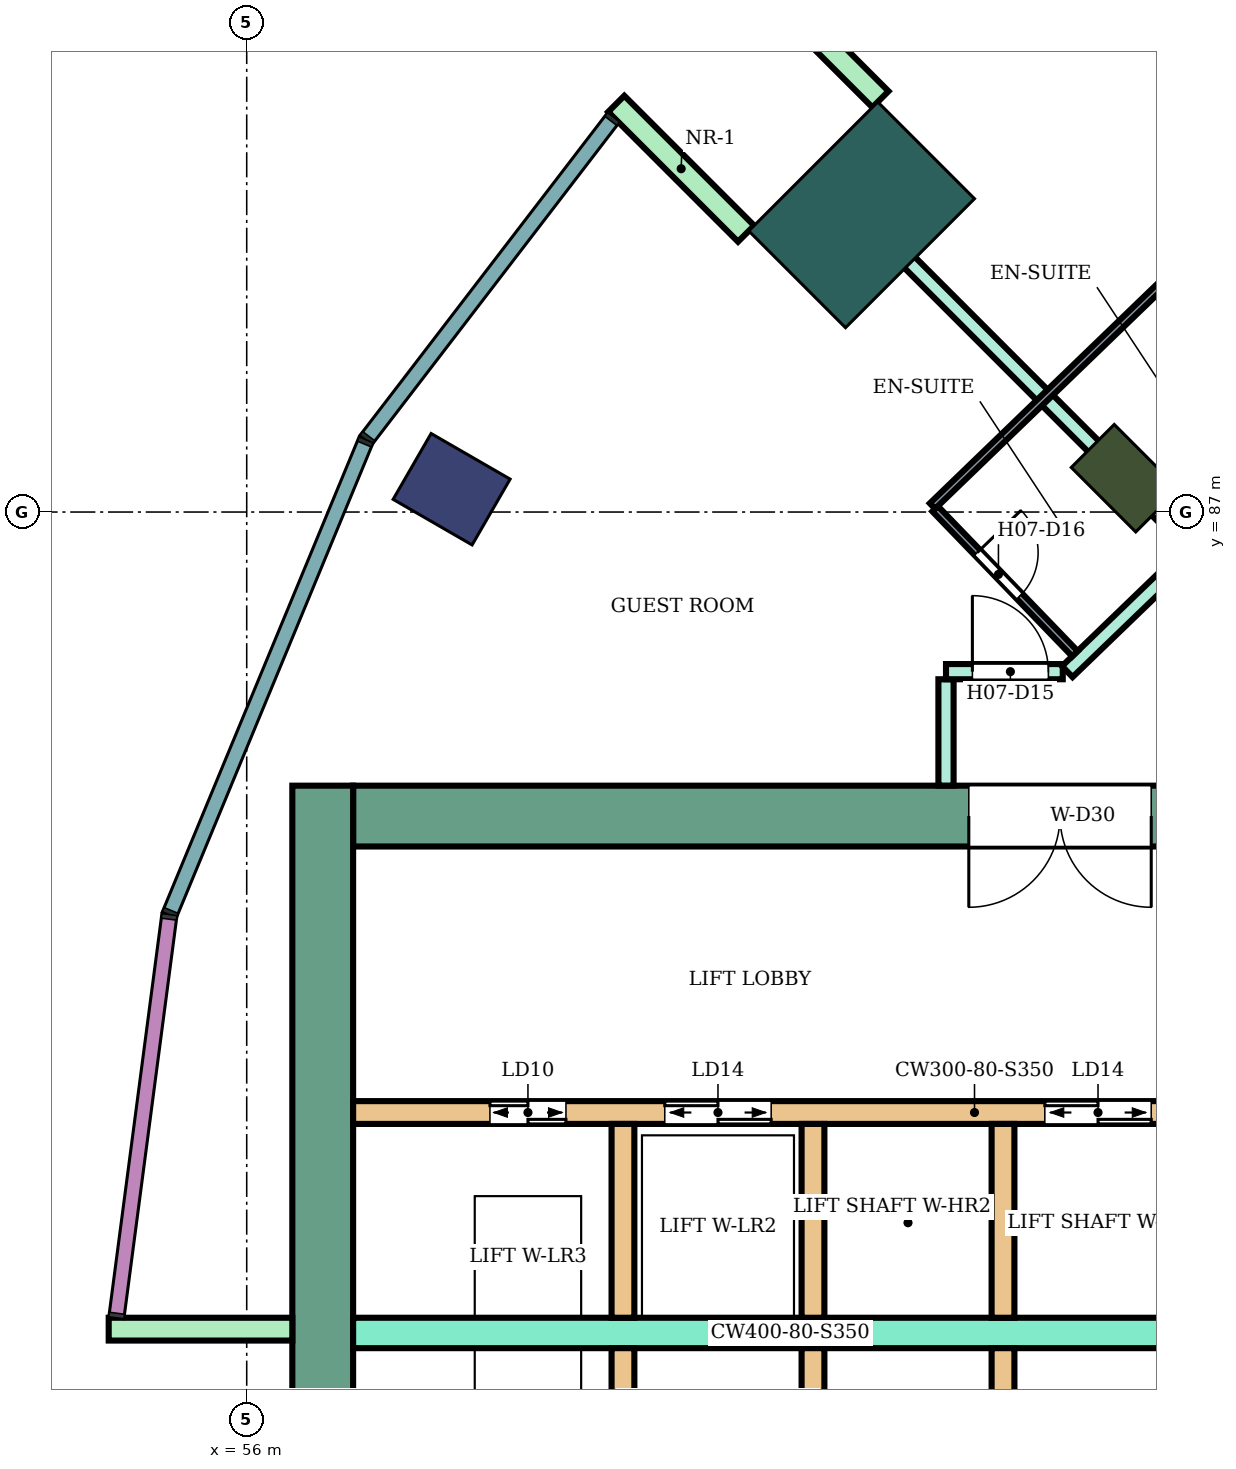
"""IFC4 building model, lengths in metres.
Left out: names, types, materials, properties, quantities, classifications, styles, units other than length and angle.
Written with IfcOpenShell. Run it as: python <this file> out.ifc"""

import sys

from ifc_helpers import new_model, si_unit, direction, frame, frame_2d, origin, origin_2d, place, context, subcontext, project, spatial, rectangle, extrude, element, fill, save


model = new_model("IFC4")
c1 = context("Model", 3, precision=1e-05, world=origin(), true_north=direction((0.0, 1.0)))
c2 = subcontext(c1, "Body", "Model", "MODEL_VIEW")
j1 = project(units=[si_unit("LENGTHUNIT", "METRE"), si_unit("PLANEANGLEUNIT", "RADIAN")], contexts=[c1])
p1 = place(None, origin())
s1 = spatial("IfcSite", under=j1, at=p1, CompositionType="ELEMENT")
p2 = place(p1, origin())
s2 = spatial("IfcBuilding", under=s1, at=p2, CompositionType="ELEMENT")
p3 = place(p2, frame((0.0, 0.0, 105.2)))
s3 = spatial("IfcBuildingStorey", under=s2, at=p3, CompositionType="ELEMENT", Elevation=105.2)
p4 = place(p3, frame((58.696, 87.3, 0.0), z_axis=(0.0, 0.0, 1.0), x_axis=(-0.866025403784, 0.5, 0.0)))
e1 = element("IfcColumn", 1, at=p4, inside=s3, PredefinedType="COLUMN", context=c2, shape_type="SweptSolid", body=[
    extrude(rectangle(XDim=1.2, YDim=1.0, at=origin_2d()), origin(), (0.0, 0.0, 1.0), 3.8),
])
p5 = place(p3, frame((67.555, 87.445, 0.0), z_axis=(0.0, 0.0, 1.0), x_axis=(-0.707106781187, 0.707106781187, 0.0)))
e2 = element("IfcColumn", 2, at=p5, inside=s3, PredefinedType="COLUMN", context=c2, shape_type="SweptSolid", body=[
    extrude(rectangle(XDim=1.2, YDim=0.8, at=origin_2d()), origin(), (0.0, 0.0, 1.0), 3.8),
])
p6 = place(p3, frame((64.09, 90.91, 0.0), z_axis=(0.0, 0.0, 1.0), x_axis=(-0.707106781187, 0.707106781187, 0.0)))
e3 = element("IfcColumn", 3, at=p6, inside=s3, PredefinedType="COLUMN", context=c2, shape_type="SweptSolid", body=[
    extrude(rectangle(XDim=1.8, YDim=2.4, at=origin_2d()), origin(), (0.0, 0.0, 1.0), 3.8),
])
p7 = place(p3, frame((72.1, 83.0, 0.0), z_axis=(0.0, 0.0, 1.0), x_axis=(-1.0, 0.0, 0.0)))
e4 = element("IfcWall", 4, at=p7, inside=s3, PredefinedType="SHEAR", context=c2, shape_type="SweptSolid", body=[
    extrude(rectangle(XDim=14.7, YDim=0.8, at=frame_2d((7.35, 0.0))), origin(), (0.0, 0.0, 1.0), 3.45),
])
p8 = place(p7, frame((4.2, 0.0, 0.0)))
e5 = element("IfcOpeningElement", 5, at=p8, cuts=e4, PredefinedType="OPENING", context=c2, shape_type="SweptSolid", body=[
    extrude(rectangle(XDim=2.4, YDim=2.4, at=frame_2d((1.2, 1.2))), frame((0.0, 0.41, 0.0), z_axis=(0.0, -1.0, 0.0), x_axis=(1.0, 0.0, 0.0)), (0.0, 0.0, 1.0), 0.82),
])
p9 = place(p3, frame((57.0, 83.4, 0.0), z_axis=(0.0, 0.0, 1.0), x_axis=(0.0, -1.0, 0.0)))
e6 = element("IfcWall", 6, at=p9, inside=s3, PredefinedType="SHEAR", context=c2, shape_type="SweptSolid", body=[
    extrude(rectangle(XDim=16.8, YDim=0.8, at=frame_2d((8.4, 0.0))), origin(), (0.0, 0.0, 1.0), 3.45),
])
p10 = place(p3, frame((68.3, 76.2, 0.0), z_axis=(0.0, 0.0, 1.0), x_axis=(-1.0, 0.0, 0.0)))
e7 = element("IfcWall", 7, at=p10, inside=s3, PredefinedType="SHEAR", context=c2, shape_type="SweptSolid", body=[
    extrude(rectangle(XDim=10.9, YDim=0.4, at=frame_2d((5.45, 0.0))), origin(), (0.0, 0.0, 1.0), 3.45),
])
p11 = place(p3, frame((68.3, 79.1, 0.0), z_axis=(0.0, 0.0, 1.0), x_axis=(-1.0, 0.0, 0.0)))
e8 = element("IfcWall", 8, at=p11, inside=s3, PredefinedType="SHEAR", context=c2, shape_type="SweptSolid", body=[
    extrude(rectangle(XDim=10.9, YDim=0.3, at=frame_2d((5.45, 0.0))), origin(), (0.0, 0.0, 1.0), 3.45),
])
p12 = place(p11, frame((0.4, 0.0, 0.0)))
e9 = element("IfcOpeningElement", 9, at=p12, cuts=e8, PredefinedType="OPENING", context=c2, shape_type="SweptSolid", body=[
    extrude(rectangle(XDim=1.4, YDim=2.1, at=frame_2d((0.7, 1.05))), frame((0.0, 0.16, 0.0), z_axis=(0.0, -1.0, 0.0), x_axis=(1.0, 0.0, 0.0)), (0.0, 0.0, 1.0), 0.32),
])
p13 = place(p11, frame((5.4, 0.0, 0.0)))
e10 = element("IfcOpeningElement", 10, at=p13, cuts=e8, PredefinedType="OPENING", context=c2, shape_type="SweptSolid", body=[
    extrude(rectangle(XDim=1.4, YDim=2.1, at=frame_2d((0.7, 1.05))), frame((0.0, 0.16, 0.0), z_axis=(0.0, -1.0, 0.0), x_axis=(1.0, 0.0, 0.0)), (0.0, 0.0, 1.0), 0.32),
])
p14 = place(p11, frame((8.1, 0.0, 0.0)))
e11 = element("IfcOpeningElement", 11, at=p14, cuts=e8, PredefinedType="OPENING", context=c2, shape_type="SweptSolid", body=[
    extrude(rectangle(XDim=1.0, YDim=2.1, at=frame_2d((0.5, 1.05))), frame((0.0, 0.16, 0.0), z_axis=(0.0, -1.0, 0.0), x_axis=(1.0, 0.0, 0.0)), (0.0, 0.0, 1.0), 0.32),
])
for number, where, z_axis, x_axis in (
    (12, (65.95, 76.0, 0.0), (0.0, 0.0, 1.0), (0.0, -1.0, 0.0)),
    (13, (63.45, 76.0, 0.0), (0.0, 0.0, 1.0), (0.0, -1.0, 0.0)),
    (14, (60.95, 76.0, 0.0), (0.0, 0.0, 1.0), (0.0, -1.0, 0.0)),
    (15, (65.95, 78.95, 0.0), (0.0, 0.0, 1.0), (0.0, -1.0, 0.0)),
    (16, (63.45, 78.95, 0.0), (0.0, 0.0, 1.0), (0.0, -1.0, 0.0)),
    (17, (60.95, 78.95, 0.0), (0.0, 0.0, 1.0), (0.0, -1.0, 0.0)),
):
    element("IfcWall", number, at=place(p3, frame(where, z_axis=z_axis, x_axis=x_axis)), inside=s3, PredefinedType="SHEAR", context=c2, shape_type="SweptSolid", body=[
        extrude(rectangle(XDim=2.55, YDim=0.3, at=frame_2d((1.275, 0.0))), origin(), (0.0, 0.0, 1.0), 3.45),
    ])
for number, where, z_axis, x_axis in (
    (18, (64.338, 92.43, 0.0), (0.0, 0.0, 1.0), (-0.707, 0.707, 0.0)),
    (19, (62.57, 90.662, 0.0), (0.0, 0.0, 1.0), (-0.707, 0.707, 0.0)),
    (20, (56.6, 76.25, 0.0), (0.0, 0.0, 1.0), (-1.0, 0.0, 0.0)),
):
    element("IfcWall", number, at=place(p3, frame(where, z_axis=z_axis, x_axis=x_axis)), inside=s3, PredefinedType="NOTDEFINED", context=c2, shape_type="SweptSolid", body=[
        extrude(rectangle(XDim=2.416, YDim=0.3, at=frame_2d((1.208, 0.0))), origin(), (0.0, 0.0, 1.0), 3.8),
    ])
p15 = place(p3, frame((63.598, 91.407, 0.0), z_axis=(0.0, 0.0, 1.0), x_axis=(0.706981183365, -0.707232356703, 0.0)))
e21 = element("IfcWall", 21, at=p15, inside=s3, PredefinedType="PARTITIONING", context=c2, shape_type="SweptSolid", body=[
    extrude(rectangle(XDim=6.804, YDim=0.2, at=frame_2d((3.402, 0.0))), origin(), (0.0, 0.0, 1.0), 3.35),
])
p16 = place(p3, frame((65.2, 83.401, 0.0), z_axis=(0.0, 0.0, 1.0), x_axis=(0.0, 1.0, 0.0)))
e22 = element("IfcWall", 22, at=p16, inside=s3, PredefinedType="PARTITIONING", context=c2, shape_type="SweptSolid", body=[
    extrude(rectangle(XDim=1.399, YDim=0.2, at=frame_2d((0.7, 0.0))), origin(), (0.0, 0.0, 1.0), 3.35),
])
p17 = place(p3, frame((65.2, 84.9, 0.0), z_axis=(0.0, 0.0, 1.0), x_axis=(1.0, 0.0, 0.0)))
e23 = element("IfcWall", 23, at=p17, inside=s3, PredefinedType="PARTITIONING", context=c2, shape_type="SweptSolid", body=[
    extrude(rectangle(XDim=1.536, YDim=0.2, at=frame_2d((0.768, 0.0))), origin(), (0.0, 0.0, 1.0), 3.35),
])
p18 = place(p17, frame((0.347, 0.0, 0.0)))
e24 = element("IfcOpeningElement", 24, at=p18, cuts=e23, PredefinedType="OPENING", context=c2, shape_type="SweptSolid", body=[
    extrude(rectangle(XDim=1.0, YDim=2.1, at=frame_2d((0.5, 1.05))), frame((0.0, 0.11, 0.0), z_axis=(0.0, -1.0, 0.0), x_axis=(1.0, 0.0, 0.0)), (0.0, 0.0, 1.0), 0.22),
])
p19 = place(p3, frame((66.795, 84.9, 0.0), z_axis=(0.0, 0.0, 1.0), x_axis=(0.719793233107, 0.694188520197, 0.0)))
e25 = element("IfcWall", 25, at=p19, inside=s3, PredefinedType="PARTITIONING", context=c2, shape_type="SweptSolid", body=[
    extrude(rectangle(XDim=6.656, YDim=0.2, at=frame_2d((3.328, 0.0))), origin(), (0.0, 0.0, 1.0), 3.35),
])
p20 = place(p3, frame((65.057, 87.043, 0.0), z_axis=(0.0, 0.0, 1.0), x_axis=(0.694324808789, -0.719661767708, 0.0)))
e26 = element("IfcWall", 26, at=p20, inside=s3, PredefinedType="PARTITIONING", context=c2, shape_type="SweptSolid", body=[
    extrude(rectangle(XDim=2.65, YDim=0.1, at=frame_2d((1.325, 0.0))), origin(), (0.0, 0.0, 1.0), 3.35),
])
p21 = place(p20, frame((0.8, 0.0, 0.0)))
e27 = element("IfcOpeningElement", 27, at=p21, cuts=e26, PredefinedType="OPENING", context=c2, shape_type="SweptSolid", body=[
    extrude(rectangle(XDim=0.8, YDim=2.1, at=frame_2d((0.4, 1.05))), frame((0.0, 0.06, 0.0), z_axis=(0.0, -1.0, 0.0), x_axis=(1.0, 0.0, 0.0)), (0.0, 0.0, 1.0), 0.12),
])
p22 = place(p3, frame((65.022, 87.079, 0.0), z_axis=(0.0, 0.0, 1.0), x_axis=(0.719684404795, 0.694301344875, 0.0)))
e28 = element("IfcWall", 28, at=p22, inside=s3, PredefinedType="PARTITIONING", context=c2, shape_type="SweptSolid", body=[
    extrude(rectangle(XDim=4.251, YDim=0.1, at=frame_2d((2.125, 0.0))), origin(), (0.0, 0.0, 1.0), 3.35),
])
p23 = place(p18, origin())
e29 = element("IfcDoor", 29, at=p23, inside=s3, OperationType="SINGLE_SWING_LEFT", PredefinedType="DOOR", context=c2, shape_type="SweptSolid", body=[
    extrude(rectangle(XDim=1.0, YDim=2.1, at=frame_2d((0.5, 1.05))), frame((0.0, 0.025, 0.0), z_axis=(0.0, -1.0, 0.0), x_axis=(1.0, 0.0, 0.0)), (0.0, 0.0, 1.0), 0.05),
])
fill(e24, e29)
p24 = place(p21, origin())
e30 = element("IfcDoor", 30, at=p24, inside=s3, OperationType="SINGLE_SWING_LEFT", PredefinedType="DOOR", context=c2, shape_type="SweptSolid", body=[
    extrude(rectangle(XDim=0.8, YDim=2.1, at=frame_2d((0.4, 1.05))), frame((0.0, 0.025, 0.0), z_axis=(0.0, -1.0, 0.0), x_axis=(1.0, 0.0, 0.0)), (0.0, 0.0, 1.0), 0.05),
])
fill(e27, e30)
p25 = place(p12, origin())
e31 = element("IfcDoor", 31, at=p25, inside=s3, OperationType="DOUBLE_DOOR_SLIDING", PredefinedType="DOOR", context=c2, shape_type="SweptSolid", body=[
    extrude(rectangle(XDim=1.4, YDim=2.1, at=frame_2d((0.7, 1.05))), frame((0.0, 0.025, 0.0), z_axis=(0.0, -1.0, 0.0), x_axis=(1.0, 0.0, 0.0)), (0.0, 0.0, 1.0), 0.05),
])
fill(e9, e31)
p26 = place(p13, origin())
e32 = element("IfcDoor", 32, at=p26, inside=s3, OperationType="DOUBLE_DOOR_SLIDING", PredefinedType="DOOR", context=c2, shape_type="SweptSolid", body=[
    extrude(rectangle(XDim=1.4, YDim=2.1, at=frame_2d((0.7, 1.05))), frame((0.0, 0.025, 0.0), z_axis=(0.0, -1.0, 0.0), x_axis=(1.0, 0.0, 0.0)), (0.0, 0.0, 1.0), 0.05),
])
fill(e10, e32)
p27 = place(p14, origin())
e33 = element("IfcDoor", 33, at=p27, inside=s3, OperationType="DOUBLE_DOOR_SLIDING", PredefinedType="DOOR", context=c2, shape_type="SweptSolid", body=[
    extrude(rectangle(XDim=1.0, YDim=2.1, at=frame_2d((0.5, 1.05))), frame((0.0, 0.025, 0.0), z_axis=(0.0, -1.0, 0.0), x_axis=(1.0, 0.0, 0.0)), (0.0, 0.0, 1.0), 0.05),
])
fill(e11, e33)
p28 = place(p8, origin())
e34 = element("IfcDoor", 34, at=p28, inside=s3, OperationType="DOUBLE_DOOR_SINGLE_SWING", PredefinedType="DOOR", context=c2, shape_type="SweptSolid", body=[
    extrude(rectangle(XDim=2.4, YDim=2.4, at=frame_2d((1.2, 1.2))), frame((0.0, 0.025, 0.0), z_axis=(0.0, -1.0, 0.0), x_axis=(1.0, 0.0, 0.0)), (0.0, 0.0, 1.0), 0.05),
])
fill(e5, e34)
save(model, sys.argv[1])
